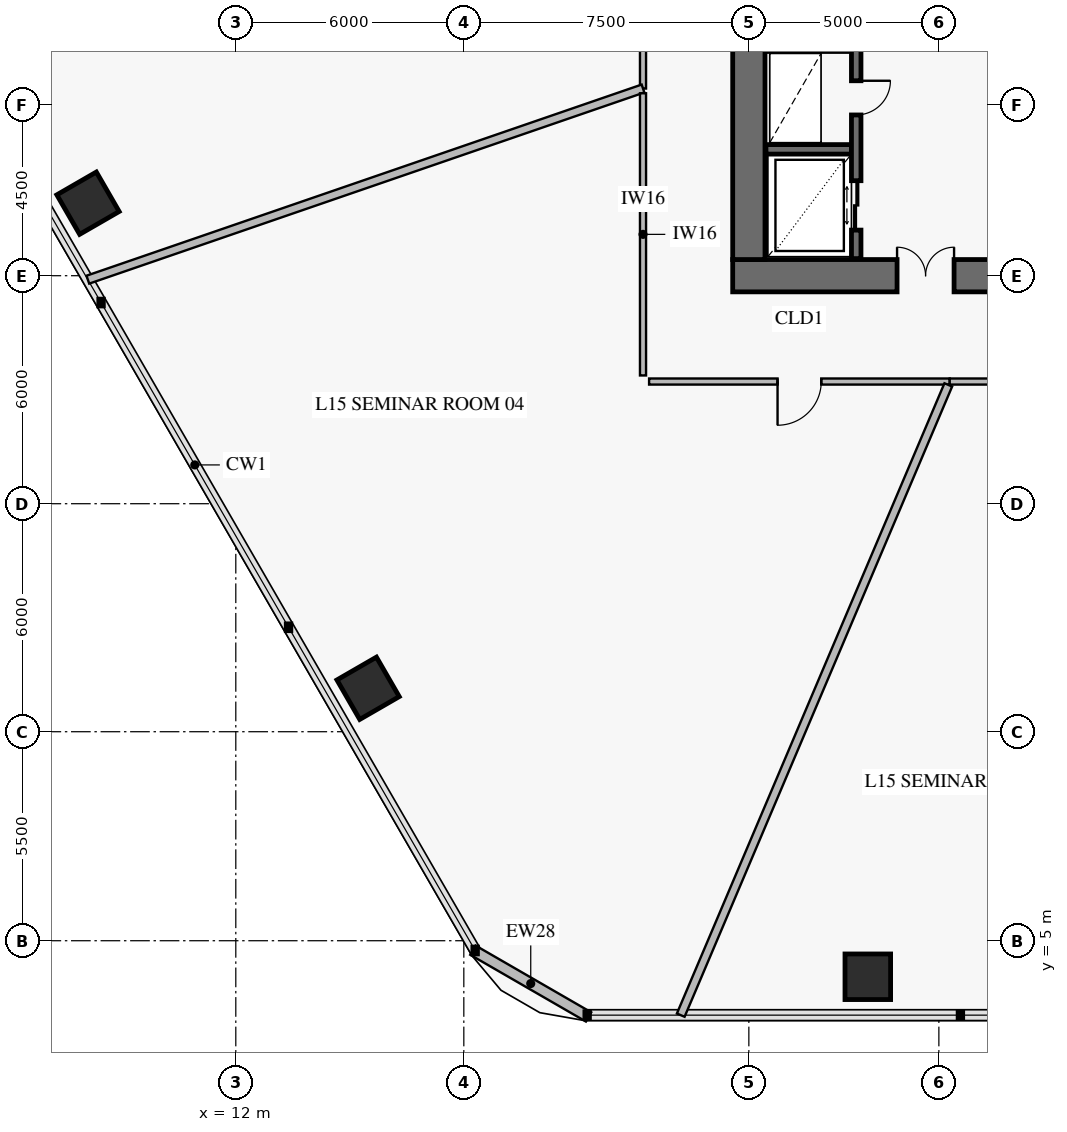
"""IFC4 building model, lengths in metres.
Left out: names, types, materials, properties, quantities, classifications, styles, units other than length and angle.
Written with IfcOpenShell. Run it as: python <this file> out.ifc"""

import sys

from ifc_helpers import new_model, si_unit, direction, frame, frame_2d, origin, origin_2d, place, context, subcontext, project, spatial, rectangle, extrude, element, fill, save


model = new_model("IFC4")
c1 = context("Model", 3, precision=1e-05, world=origin(), true_north=direction((0.0, 1.0)))
c2 = subcontext(c1, "Body", "Model", "MODEL_VIEW")
j1 = project(units=[si_unit("LENGTHUNIT", "METRE"), si_unit("PLANEANGLEUNIT", "RADIAN")], contexts=[c1])
p1 = place(None, origin())
s1 = spatial("IfcSite", under=j1, at=p1, CompositionType="ELEMENT")
p2 = place(p1, origin())
s2 = spatial("IfcBuilding", under=s1, at=p2, CompositionType="ELEMENT")
p3 = place(p2, frame((0.0, 0.0, 62.4)))
s3 = spatial("IfcBuildingStorey", under=s2, at=p3, CompositionType="ELEMENT", Elevation=62.4)
p4 = place(p3, frame((25.075, 22.5, 0.0), z_axis=(0.0, 0.0, 1.0), x_axis=(1.0, 0.0, 0.0)))
e1 = element("IfcWall", 1, at=p4, inside=s3, PredefinedType="SHEAR", context=c2, shape_type="SweptSolid", body=[
    extrude(rectangle(XDim=9.975, YDim=0.85, at=frame_2d((4.988, 0.0))), origin(), (0.0, 0.0, 1.0), 4.2),
])
p5 = place(p4, frame((4.325, 0.0, 0.0)))
e2 = element("IfcOpeningElement", 2, at=p5, cuts=e1, PredefinedType="OPENING", context=c2, shape_type="SweptSolid", body=[
    extrude(rectangle(XDim=1.5, YDim=2.15, at=frame_2d((0.75, 1.075))), frame((0.0, 0.437, 0.0), z_axis=(0.0, -1.0, 0.0), x_axis=(1.0, 0.0, 0.0)), (0.0, 0.0, 1.0), 0.874),
])
p6 = place(p3, frame((25.5, 22.925, 0.0), z_axis=(0.0, 0.0, 1.0), x_axis=(0.0, 1.0, 0.0)))
e3 = element("IfcWall", 3, at=p6, inside=s3, PredefinedType="SHEAR", context=c2, shape_type="SweptSolid", body=[
    extrude(rectangle(XDim=18.15, YDim=0.85, at=frame_2d((9.075, 0.0))), origin(), (0.0, 0.0, 1.0), 4.2),
])
p7 = place(p6, frame((8.825, 0.0, 0.0)))
e4 = element("IfcOpeningElement", 4, at=p7, cuts=e3, PredefinedType="OPENING", context=c2, shape_type="SweptSolid", body=[
    extrude(rectangle(XDim=1.1, YDim=2.15, at=frame_2d((0.55, 1.075))), frame((0.0, 0.437, 0.0), z_axis=(0.0, -1.0, 0.0), x_axis=(1.0, 0.0, 0.0)), (0.0, 0.0, 1.0), 0.874),
])
for number, where, z_axis, x_axis in (
    (5, (8.111, 24.408, 0.0), (0.0, 0.0, 1.0), (0.5, -0.866, 0.0)),
    (6, (15.481, 11.643, 0.0), (0.0, 0.0, 1.0), (0.5, -0.866, 0.0)),
    (7, (28.63, 4.052, 0.0), (0.0, 0.0, 1.0), (1.0, 0.0, 0.0)),
):
    element("IfcColumn", number, at=place(p3, frame(where, z_axis=z_axis, x_axis=x_axis)), inside=s3, PredefinedType="COLUMN", context=c2, shape_type="SweptSolid", body=[
        extrude(rectangle(XDim=1.2, YDim=1.2, at=origin_2d()), origin(), (0.0, 0.0, 1.0), 3.92),
    ])
p8 = place(p3, frame((21.283, 2.994, 0.0), z_axis=(0.0, 0.0, 1.0), x_axis=(-0.866007452331, 0.500031091541, 0.0)))
e8 = element("IfcWall", 8, at=p8, inside=s3, PredefinedType="SOLIDWALL", context=c2, shape_type="SweptSolid", body=[
    extrude(rectangle(XDim=3.515, YDim=0.28, at=frame_2d((1.757, 0.0))), origin(), (0.0, 0.0, 1.0), 3.92),
])
p9 = place(p3, frame((25.95, 25.825, 0.0), z_axis=(0.0, 0.0, 1.0), x_axis=(1.0, 0.0, 0.0)))
e9 = element("IfcWall", 9, at=p9, inside=s3, PredefinedType="SOLIDWALL", context=c2, shape_type="SweptSolid", body=[
    extrude(rectangle(XDim=2.25, YDim=0.25, at=frame_2d((1.125, 0.0))), origin(), (0.0, 0.0, 1.0), 4.2),
])
p10 = place(p3, frame((28.325, 22.95, 0.0), z_axis=(0.0, 0.0, 1.0), x_axis=(0.0, 1.0, 0.0)))
e10 = element("IfcWall", 10, at=p10, inside=s3, PredefinedType="SOLIDWALL", context=c2, shape_type="SweptSolid", body=[
    extrude(rectangle(XDim=8.2, YDim=0.25, at=frame_2d((4.1, 0.0))), origin(), (0.0, 0.0, 1.0), 4.2),
])
p11 = place(p10, frame((0.75, 0.0, 0.0)))
e11 = element("IfcOpeningElement", 11, at=p11, cuts=e10, PredefinedType="OPENING", context=c2, shape_type="SweptSolid", body=[
    extrude(rectangle(XDim=1.3, YDim=2.3, at=frame_2d((0.65, 1.15))), frame((0.0, 0.137, 0.0), z_axis=(0.0, -1.0, 0.0), x_axis=(1.0, 0.0, 0.0)), (0.0, 0.0, 1.0), 0.274),
])
p12 = place(p10, frame((3.78, 0.0, 0.0)))
e12 = element("IfcOpeningElement", 12, at=p12, cuts=e10, PredefinedType="OPENING", context=c2, shape_type="SweptSolid", body=[
    extrude(rectangle(XDim=0.9, YDim=2.1, at=frame_2d((0.45, 1.05))), frame((0.0, 0.137, 0.0), z_axis=(0.0, -1.0, 0.0), x_axis=(1.0, 0.0, 0.0)), (0.0, 0.0, 1.0), 0.274),
])
p13 = place(p10, frame((6.5, 0.0, 0.0)))
e13 = element("IfcOpeningElement", 13, at=p13, cuts=e10, PredefinedType="OPENING", context=c2, shape_type="SweptSolid", body=[
    extrude(rectangle(XDim=0.9, YDim=2.1, at=frame_2d((0.45, 1.05))), frame((0.0, 0.137, 0.0), z_axis=(0.0, -1.0, 0.0), x_axis=(1.0, 0.0, 0.0)), (0.0, 0.0, 1.0), 0.274),
])
p14 = place(p3, frame((22.715, 33.162, 0.0), z_axis=(0.0, 0.0, 1.0), x_axis=(0.0, -1.0, 0.0)))
e14 = element("IfcWall", 14, at=p14, inside=s3, PredefinedType="PARTITIONING", context=c2, shape_type="SweptSolid", body=[
    extrude(rectangle(XDim=5.737, YDim=0.16, at=frame_2d((2.868, 0.0))), origin(), (0.0, 0.0, 1.0), 3.22),
])
p15 = place(p14, frame((2.293, 0.0, 0.0)))
e15 = element("IfcOpeningElement", 15, at=p15, cuts=e14, PredefinedType="OPENING", context=c2, shape_type="SweptSolid", body=[
    extrude(rectangle(XDim=1.15, YDim=2.2, at=frame_2d((0.575, 1.1))), frame((0.0, 0.092, 0.0), z_axis=(0.0, -1.0, 0.0), x_axis=(1.0, 0.0, 0.0)), (0.0, 0.0, 1.0), 0.184),
])
p16 = place(p3, frame((22.875, 19.715, 0.0), z_axis=(0.0, 0.0, 1.0), x_axis=(1.0, 0.0, 0.0)))
e16 = element("IfcWall", 16, at=p16, inside=s3, PredefinedType="PARTITIONING", context=c2, shape_type="SweptSolid", body=[
    extrude(rectangle(XDim=7.91, YDim=0.16, at=frame_2d((3.955, 0.0))), origin(), (0.0, 0.0, 1.0), 3.22),
])
p17 = place(p16, frame((3.38, 0.0, 0.0)))
e17 = element("IfcOpeningElement", 17, at=p17, cuts=e16, PredefinedType="OPENING", context=c2, shape_type="SweptSolid", body=[
    extrude(rectangle(XDim=1.15, YDim=2.2, at=frame_2d((0.575, 1.1))), frame((0.0, 0.092, 0.0), z_axis=(0.0, -1.0, 0.0), x_axis=(1.0, 0.0, 0.0)), (0.0, 0.0, 1.0), 0.184),
])
p18 = place(p3, frame((30.785, 19.715, 0.0), z_axis=(0.0, 0.0, 1.0), x_axis=(1.0, 0.0, 0.0)))
e18 = element("IfcWall", 18, at=p18, inside=s3, PredefinedType="PARTITIONING", context=c2, shape_type="SweptSolid", body=[
    extrude(rectangle(XDim=5.429, YDim=0.16, at=frame_2d((2.714, 0.0))), origin(), (0.0, 0.0, 1.0), 3.22),
])
p19 = place(p18, frame((2.139, 0.0, 0.0)))
e19 = element("IfcOpeningElement", 19, at=p19, cuts=e18, PredefinedType="OPENING", context=c2, shape_type="SweptSolid", body=[
    extrude(rectangle(XDim=1.15, YDim=2.2, at=frame_2d((0.575, 1.1))), frame((0.0, 0.092, 0.0), z_axis=(0.0, -1.0, 0.0), x_axis=(1.0, 0.0, 0.0)), (0.0, 0.0, 1.0), 0.184),
])
p20 = place(p3, frame((22.715, 27.426, 0.0), z_axis=(0.0, 0.0, 1.0), x_axis=(-0.945519485553, -0.325565511746, 0.0)))
e20 = element("IfcWall", 20, at=p20, inside=s3, PredefinedType="PARTITIONING", context=c2, shape_type="SweptSolid", body=[
    extrude(rectangle(XDim=15.45, YDim=0.22, at=frame_2d((7.725, 0.0))), origin(), (0.0, 0.0, 1.0), 3.17),
])
p21 = place(p3, frame((22.715, 27.301, 0.0), z_axis=(0.0, 0.0, 1.0), x_axis=(0.0, -1.0, 0.0)))
e21 = element("IfcWall", 21, at=p21, inside=s3, PredefinedType="PARTITIONING", context=c2, shape_type="SweptSolid", body=[
    extrude(rectangle(XDim=7.426, YDim=0.16, at=frame_2d((3.713, 0.0))), origin(), (0.0, 0.0, 1.0), 3.92),
])
p22 = place(p3, frame((30.748, 19.627, 0.0), z_axis=(0.0, 0.0, 1.0), x_axis=(-0.39073948494, -0.920501306305, 0.0)))
e22 = element("IfcWall", 22, at=p22, inside=s3, PredefinedType="PARTITIONING", context=c2, shape_type="SweptSolid", body=[
    extrude(rectangle(XDim=18.018, YDim=0.22, at=frame_2d((9.009, 0.0))), origin(), (0.0, 0.0, 1.0), 3.17),
])
p23 = place(p5, origin())
e23 = element("IfcDoor", 23, at=p23, inside=s3, OperationType="DOUBLE_DOOR_SINGLE_SWING", PredefinedType="DOOR", context=c2, shape_type="SweptSolid", body=[
    extrude(rectangle(XDim=1.5, YDim=2.15, at=frame_2d((0.75, 1.075))), frame((0.0, 0.025, 0.0), z_axis=(0.0, -1.0, 0.0), x_axis=(1.0, 0.0, 0.0)), (0.0, 0.0, 1.0), 0.05),
])
fill(e2, e23)
p24 = place(p11, frame((1.3, 0.0, 0.0), z_axis=(0.0, 0.0, 1.0), x_axis=(-1.0, 0.0, 0.0)))
e24 = element("IfcDoor", 24, at=p24, inside=s3, OperationType="DOUBLE_DOOR_SLIDING", PredefinedType="DOOR", context=c2, shape_type="SweptSolid", body=[
    extrude(rectangle(XDim=1.3, YDim=2.3, at=frame_2d((0.65, 1.15))), frame((0.0, 0.025, 0.0), z_axis=(0.0, -1.0, 0.0), x_axis=(1.0, 0.0, 0.0)), (0.0, 0.0, 1.0), 0.05),
])
fill(e11, e24)
p25 = place(p12, frame((0.9, 0.0, 0.0), z_axis=(0.0, 0.0, 1.0), x_axis=(-1.0, 0.0, 0.0)))
e25 = element("IfcDoor", 25, at=p25, inside=s3, OperationType="SINGLE_SWING_LEFT", PredefinedType="DOOR", context=c2, shape_type="SweptSolid", body=[
    extrude(rectangle(XDim=0.9, YDim=2.1, at=frame_2d((0.45, 1.05))), frame((0.0, 0.025, 0.0), z_axis=(0.0, -1.0, 0.0), x_axis=(1.0, 0.0, 0.0)), (0.0, 0.0, 1.0), 0.05),
])
fill(e12, e25)
p26 = place(p17, frame((1.15, 0.0, 0.0), z_axis=(0.0, 0.0, 1.0), x_axis=(-1.0, 0.0, 0.0)))
e26 = element("IfcDoor", 26, at=p26, inside=s3, OperationType="SINGLE_SWING_RIGHT", PredefinedType="DOOR", context=c2, shape_type="SweptSolid", body=[
    extrude(rectangle(XDim=1.15, YDim=2.2, at=frame_2d((0.575, 1.1))), frame((0.0, 0.025, 0.0), z_axis=(0.0, -1.0, 0.0), x_axis=(1.0, 0.0, 0.0)), (0.0, 0.0, 1.0), 0.05),
])
fill(e17, e26)
save(model, sys.argv[1])
